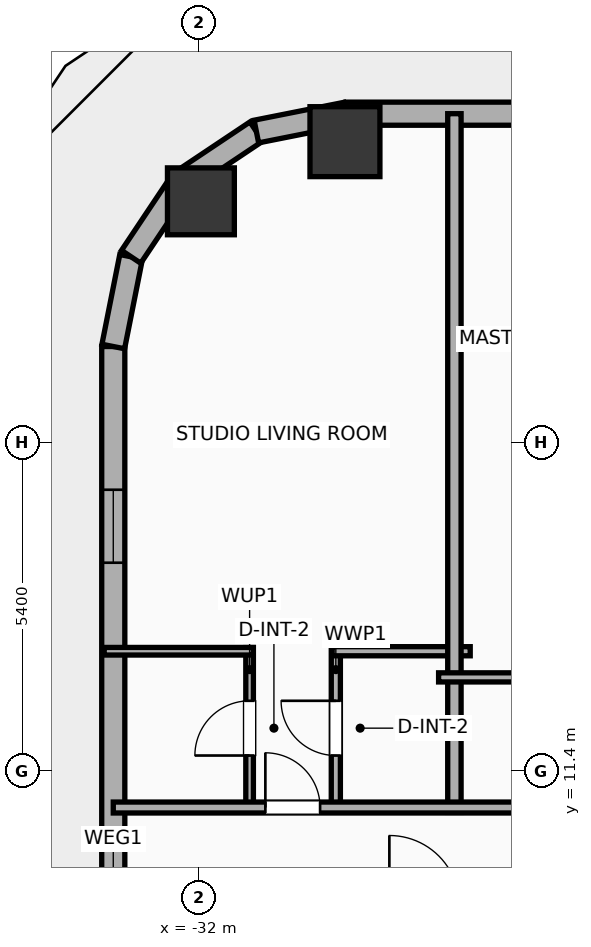
"""IFC4 building model, lengths in metres.
Left out: names, types, materials, properties, quantities, classifications, styles, units other than length and angle.
Written with IfcOpenShell. Run it as: python <this file> out.ifc"""

import sys

from ifc_helpers import new_model, si_unit, direction, frame, frame_2d, origin, origin_2d, place, context, subcontext, project, spatial, rectangle, hollow_rectangle, hollow_circle, extrude, element, fill, save


model = new_model("IFC4")
c1 = context("Model", 3, precision=1e-05, world=origin(), true_north=direction((0.0, 1.0)))
c2 = subcontext(c1, "Body", "Model", "MODEL_VIEW")
j1 = project(units=[si_unit("LENGTHUNIT", "METRE"), si_unit("PLANEANGLEUNIT", "RADIAN")], contexts=[c1])
p1 = place(None, origin())
s1 = spatial("IfcSite", under=j1, at=p1, CompositionType="ELEMENT")
p2 = place(p1, origin())
s2 = spatial("IfcBuilding", under=s1, at=p2, CompositionType="ELEMENT")
p3 = place(p2, frame((0.0, 0.0, 53.3)))
s3 = spatial("IfcBuildingStorey", under=s2, at=p3, CompositionType="ELEMENT", Elevation=53.3)
p4 = place(p3, frame((-29.6, 21.75, 0.0), z_axis=(0.0, 0.0, 1.0), x_axis=(1.0, 0.0, 0.0)))
e1 = element("IfcColumn", 1, at=p4, inside=s3, PredefinedType="COLUMN", context=c2, shape_type="SweptSolid", body=[
    extrude(hollow_rectangle(XDim=1.15, YDim=1.15, WallThickness=0.04, at=origin_2d()), origin(), (0.0, 0.0, 1.0), 3.9),
])
p5 = place(p3, frame((-31.969, 20.769, 0.0), z_axis=(0.0, 0.0, 1.0), x_axis=(1.0, 0.0, 0.0)))
e2 = element("IfcColumn", 2, at=p5, inside=s3, PredefinedType="COLUMN", context=c2, shape_type="SweptSolid", body=[
    extrude(hollow_circle(Radius=0.55, WallThickness=0.036, at=origin_2d()), origin(), (0.0, 0.0, 1.0), 3.9),
])
p6 = place(p3, frame((-33.41, -18.381, 0.0), z_axis=(0.0, 0.0, 1.0), x_axis=(0.0, 1.0, 0.0)))
e3 = element("IfcWall", 3, at=p6, inside=s3, PredefinedType="ELEMENTEDWALL", context=c2, shape_type="SweptSolid", body=[
    extrude(rectangle(XDim=36.763, YDim=0.38, at=frame_2d((18.381, 0.0))), origin(), (0.0, 0.0, 1.0), 3.65),
])
p7 = place(p6, frame((17.631, 0.0, 0.0)))
e4 = element("IfcOpeningElement", 4, at=p7, cuts=e3, PredefinedType="OPENING", context=c2, shape_type="SweptSolid", body=[
    extrude(rectangle(XDim=1.5, YDim=2.05, at=frame_2d((0.75, 1.025))), frame((0.0, 0.2, 0.0), z_axis=(0.0, -1.0, 0.0), x_axis=(1.0, 0.0, 0.0)), (0.0, 0.0, 1.0), 0.4),
])
p8 = place(p6, frame((33.207, 0.0, 0.75)))
e5 = element("IfcOpeningElement", 5, at=p8, cuts=e3, PredefinedType="OPENING", context=c2, shape_type="SweptSolid", body=[
    extrude(rectangle(XDim=1.2, YDim=2.05, at=frame_2d((0.6, 1.025))), frame((0.0, 0.2, 0.0), z_axis=(0.0, -1.0, 0.0), x_axis=(1.0, 0.0, 0.0)), (0.0, 0.0, 1.0), 0.4),
])
p9 = place(p3, frame((-33.41, 18.381, 0.0), z_axis=(0.0, 0.0, 1.0), x_axis=(0.195086038585, 0.980786132421, 0.0)))
e6 = element("IfcWall", 6, at=p9, inside=s3, PredefinedType="ELEMENTEDWALL", context=c2, shape_type="SweptSolid", body=[
    extrude(rectangle(XDim=1.504, YDim=0.38, at=frame_2d((0.752, 0.0))), origin(), (0.0, 0.0, 1.0), 3.65),
])
p10 = place(p3, frame((-33.116, 19.857, 0.0), z_axis=(0.0, 0.0, 1.0), x_axis=(0.555572577804, 0.831468045563, 0.0)))
e7 = element("IfcWall", 7, at=p10, inside=s3, PredefinedType="ELEMENTEDWALL", context=c2, shape_type="SweptSolid", body=[
    extrude(rectangle(XDim=1.485, YDim=0.38, at=frame_2d((0.742, 0.0))), origin(), (0.0, 0.0, 1.0), 3.65),
])
p11 = place(p3, frame((-32.292, 21.091, 0.0), z_axis=(0.0, 0.0, 1.0), x_axis=(0.831442848281, 0.555610286119, 0.0)))
e8 = element("IfcWall", 8, at=p11, inside=s3, PredefinedType="ELEMENTEDWALL", context=c2, shape_type="SweptSolid", body=[
    extrude(rectangle(XDim=1.485, YDim=0.38, at=frame_2d((0.743, 0.0))), origin(), (0.0, 0.0, 1.0), 3.65),
])
p12 = place(p3, frame((-31.057, 21.917, 0.0), z_axis=(0.0, 0.0, 1.0), x_axis=(0.980786132421, 0.195086038585, 0.0)))
e9 = element("IfcWall", 9, at=p12, inside=s3, PredefinedType="ELEMENTEDWALL", context=c2, shape_type="SweptSolid", body=[
    extrude(rectangle(XDim=1.504, YDim=0.38, at=frame_2d((0.752, 0.0))), origin(), (0.0, 0.0, 1.0), 3.65),
])
p13 = place(p3, frame((-29.581, 22.21, 0.0), z_axis=(0.0, 0.0, 1.0), x_axis=(1.0, 0.0, 0.0)))
e10 = element("IfcWall", 10, at=p13, inside=s3, PredefinedType="ELEMENTEDWALL", context=c2, shape_type="SweptSolid", body=[
    extrude(rectangle(XDim=51.963, YDim=0.38, at=frame_2d((25.981, 0.0))), origin(), (0.0, 0.0, 1.0), 3.65),
])
p14 = place(p13, frame((6.61, 0.0, 0.75)))
e11 = element("IfcOpeningElement", 11, at=p14, cuts=e10, PredefinedType="OPENING", context=c2, shape_type="SweptSolid", body=[
    extrude(rectangle(XDim=2.4, YDim=2.1, at=frame_2d((1.2, 1.05))), frame((0.0, 0.2, 0.0), z_axis=(0.0, -1.0, 0.0), x_axis=(1.0, 0.0, 0.0)), (0.0, 0.0, 1.0), 0.4),
])
p15 = place(p13, frame((26.431, 0.0, 0.75)))
e12 = element("IfcOpeningElement", 12, at=p15, cuts=e10, PredefinedType="OPENING", context=c2, shape_type="SweptSolid", body=[
    extrude(rectangle(XDim=2.4, YDim=2.1, at=frame_2d((1.2, 1.05))), frame((0.0, 0.2, 0.0), z_axis=(0.0, -1.0, 0.0), x_axis=(1.0, 0.0, 0.0)), (0.0, 0.0, 1.0), 0.4),
])
p16 = place(p13, frame((43.752, 0.0, 0.75)))
e13 = element("IfcOpeningElement", 13, at=p16, cuts=e10, PredefinedType="OPENING", context=c2, shape_type="SweptSolid", body=[
    extrude(rectangle(XDim=2.4, YDim=2.1, at=frame_2d((1.2, 1.05))), frame((0.0, 0.2, 0.0), z_axis=(0.0, -1.0, 0.0), x_axis=(1.0, 0.0, 0.0)), (0.0, 0.0, 1.0), 0.4),
])
p17 = place(p13, frame((2.789, 0.0, 0.75)))
e14 = element("IfcOpeningElement", 14, at=p17, cuts=e10, PredefinedType="OPENING", context=c2, shape_type="SweptSolid", body=[
    extrude(rectangle(XDim=1.2, YDim=2.05, at=frame_2d((0.6, 1.025))), frame((0.0, 0.2, 0.0), z_axis=(0.0, -1.0, 0.0), x_axis=(1.0, 0.0, 0.0)), (0.0, 0.0, 1.0), 0.4),
])
p18 = place(p13, frame((16.831, 0.0, 0.75)))
e15 = element("IfcOpeningElement", 15, at=p18, cuts=e10, PredefinedType="OPENING", context=c2, shape_type="SweptSolid", body=[
    extrude(rectangle(XDim=1.2, YDim=2.05, at=frame_2d((0.6, 1.025))), frame((0.0, 0.2, 0.0), z_axis=(0.0, -1.0, 0.0), x_axis=(1.0, 0.0, 0.0)), (0.0, 0.0, 1.0), 0.4),
])
p19 = place(p13, frame((13.136, 0.0, 0.75)))
e16 = element("IfcOpeningElement", 16, at=p19, cuts=e10, PredefinedType="OPENING", context=c2, shape_type="SweptSolid", body=[
    extrude(rectangle(XDim=1.2, YDim=2.05, at=frame_2d((0.6, 1.025))), frame((0.0, 0.2, 0.0), z_axis=(0.0, -1.0, 0.0), x_axis=(1.0, 0.0, 0.0)), (0.0, 0.0, 1.0), 0.4),
])
p20 = place(p13, frame((21.456, 0.0, 0.75)))
e17 = element("IfcOpeningElement", 17, at=p20, cuts=e10, PredefinedType="OPENING", context=c2, shape_type="SweptSolid", body=[
    extrude(rectangle(XDim=0.52, YDim=2.05, at=frame_2d((0.26, 1.025))), frame((0.0, 0.2, 0.0), z_axis=(0.0, -1.0, 0.0), x_axis=(1.0, 0.0, 0.0)), (0.0, 0.0, 1.0), 0.4),
])
p21 = place(p13, frame((23.507, 0.0, 0.75)))
e18 = element("IfcOpeningElement", 18, at=p21, cuts=e10, PredefinedType="OPENING", context=c2, shape_type="SweptSolid", body=[
    extrude(rectangle(XDim=1.2, YDim=2.05, at=frame_2d((0.6, 1.025))), frame((0.0, 0.2, 0.0), z_axis=(0.0, -1.0, 0.0), x_axis=(1.0, 0.0, 0.0)), (0.0, 0.0, 1.0), 0.4),
])
p22 = place(p13, frame((37.494, 0.0, 0.75)))
e19 = element("IfcOpeningElement", 19, at=p22, cuts=e10, PredefinedType="OPENING", context=c2, shape_type="SweptSolid", body=[
    extrude(rectangle(XDim=1.2, YDim=2.05, at=frame_2d((0.6, 1.025))), frame((0.0, 0.2, 0.0), z_axis=(0.0, -1.0, 0.0), x_axis=(1.0, 0.0, 0.0)), (0.0, 0.0, 1.0), 0.4),
])
p23 = place(p13, frame((33.733, 0.0, 0.75)))
e20 = element("IfcOpeningElement", 20, at=p23, cuts=e10, PredefinedType="OPENING", context=c2, shape_type="SweptSolid", body=[
    extrude(rectangle(XDim=1.2, YDim=2.05, at=frame_2d((0.6, 1.025))), frame((0.0, 0.2, 0.0), z_axis=(0.0, -1.0, 0.0), x_axis=(1.0, 0.0, 0.0)), (0.0, 0.0, 1.0), 0.4),
])
p24 = place(p13, frame((42.323, 0.0, 0.75)))
e21 = element("IfcOpeningElement", 21, at=p24, cuts=e10, PredefinedType="OPENING", context=c2, shape_type="SweptSolid", body=[
    extrude(rectangle(XDim=0.52, YDim=2.05, at=frame_2d((0.26, 1.025))), frame((0.0, 0.2, 0.0), z_axis=(0.0, -1.0, 0.0), x_axis=(1.0, 0.0, 0.0)), (0.0, 0.0, 1.0), 0.4),
])
p25 = place(p13, frame((47.601, 0.0, 0.75)))
e22 = element("IfcOpeningElement", 22, at=p25, cuts=e10, PredefinedType="OPENING", context=c2, shape_type="SweptSolid", body=[
    extrude(rectangle(XDim=1.2, YDim=2.05, at=frame_2d((0.6, 1.025))), frame((0.0, 0.2, 0.0), z_axis=(0.0, -1.0, 0.0), x_axis=(1.0, 0.0, 0.0)), (0.0, 0.0, 1.0), 0.4),
])
p26 = place(p13, frame((49.681, 0.0, 0.75)))
e23 = element("IfcOpeningElement", 23, at=p26, cuts=e10, PredefinedType="OPENING", context=c2, shape_type="SweptSolid", body=[
    extrude(rectangle(XDim=1.2, YDim=2.05, at=frame_2d((0.6, 1.025))), frame((0.0, 0.2, 0.0), z_axis=(0.0, -1.0, 0.0), x_axis=(1.0, 0.0, 0.0)), (0.0, 0.0, 1.0), 0.4),
])
p27 = place(p3, frame((-31.168, 10.78, 0.0), z_axis=(0.0, 0.0, 1.0), x_axis=(0.0, 1.0, 0.0)))
e24 = element("IfcWall", 24, at=p27, inside=s3, PredefinedType="PARTITIONING", context=c2, shape_type="SweptSolid", body=[
    extrude(rectangle(XDim=2.65, YDim=0.125, at=frame_2d((1.325, 0.0))), origin(), (0.0, 0.0, 1.0), 3.65),
])
p28 = place(p27, frame((0.875, 0.0, 0.0)))
e25 = element("IfcOpeningElement", 25, at=p28, cuts=e24, PredefinedType="OPENING", context=c2, shape_type="SweptSolid", body=[
    extrude(rectangle(XDim=0.9, YDim=2.05, at=frame_2d((0.45, 1.025))), frame((0.0, 0.073, 0.0), z_axis=(0.0, -1.0, 0.0), x_axis=(1.0, 0.0, 0.0)), (0.0, 0.0, 1.0), 0.145),
])
p29 = place(p3, frame((-29.75, 10.78, 0.0), z_axis=(0.0, 0.0, 1.0), x_axis=(0.0, 1.0, 0.0)))
e26 = element("IfcWall", 26, at=p29, inside=s3, PredefinedType="PLUMBINGWALL", context=c2, shape_type="SweptSolid", body=[
    extrude(rectangle(XDim=2.65, YDim=0.15, at=frame_2d((1.325, 0.0))), origin(), (0.0, 0.0, 1.0), 3.65),
])
p30 = place(p29, frame((0.875, 0.0, 0.0)))
e27 = element("IfcOpeningElement", 27, at=p30, cuts=e26, PredefinedType="OPENING", context=c2, shape_type="SweptSolid", body=[
    extrude(rectangle(XDim=0.9, YDim=2.05, at=frame_2d((0.45, 1.025))), frame((0.0, 0.085, 0.0), z_axis=(0.0, -1.0, 0.0), x_axis=(1.0, 0.0, 0.0)), (0.0, 0.0, 1.0), 0.17),
])
p31 = place(p3, frame((-33.56, 13.37, 0.0), z_axis=(0.0, 0.0, 1.0), x_axis=(1.0, 0.0, 0.0)))
e28 = element("IfcWall", 28, at=p31, inside=s3, PredefinedType="PARTITIONING", context=c2, shape_type="SweptSolid", body=[
    extrude(rectangle(XDim=2.452, YDim=0.125, at=frame_2d((1.226, 0.0))), origin(), (0.0, 0.0, 1.0), 3.65),
])
p32 = place(p3, frame((-29.81, 13.37, 0.0), z_axis=(0.0, 0.0, 1.0), x_axis=(1.0, 0.0, 0.0)))
e29 = element("IfcWall", 29, at=p32, inside=s3, PredefinedType="PLUMBINGWALL", context=c2, shape_type="SweptSolid", body=[
    extrude(rectangle(XDim=2.27, YDim=0.15, at=frame_2d((1.135, 0.0))), origin(), (0.0, 0.0, 1.0), 3.65),
])
p33 = place(p3, frame((-27.8, 10.72, 0.0), z_axis=(0.0, 0.0, 1.0), x_axis=(0.0, 1.0, 0.0)))
e30 = element("IfcWall", 30, at=p33, inside=s3, PredefinedType="PARTITIONING", context=c2, shape_type="SweptSolid", body=[
    extrude(rectangle(XDim=11.49, YDim=0.22, at=frame_2d((5.745, 0.0))), origin(), (0.0, 0.0, 1.0), 3.65),
])
p34 = place(p3, frame((-28.06, 12.94, 0.0), z_axis=(0.0, 0.0, 1.0), x_axis=(1.0, 0.0, 0.0)))
e31 = element("IfcWall", 31, at=p34, inside=s3, PredefinedType="PLUMBINGWALL", context=c2, shape_type="SweptSolid", body=[
    extrude(rectangle(XDim=3.555, YDim=0.15, at=frame_2d((1.778, 0.0))), origin(), (0.0, 0.0, 1.0), 3.65),
])
p35 = place(p3, frame((-33.41, 10.8, 0.0), z_axis=(0.0, 0.0, 1.0), x_axis=(1.0, 0.0, 0.0)))
e32 = element("IfcWall", 32, at=p35, inside=s3, PredefinedType="PARTITIONING", context=c2, shape_type="SweptSolid", body=[
    extrude(rectangle(XDim=59.62, YDim=0.18, at=frame_2d((29.81, 0.0))), origin(), (0.0, 0.0, 1.0), 3.65),
])
p36 = place(p35, frame((2.501, 0.0, 0.0)))
e33 = element("IfcOpeningElement", 33, at=p36, cuts=e32, PredefinedType="OPENING", context=c2, shape_type="SweptSolid", body=[
    extrude(rectangle(XDim=0.9, YDim=2.05, at=frame_2d((0.45, 1.025))), frame((0.0, 0.1, 0.0), z_axis=(0.0, -1.0, 0.0), x_axis=(1.0, 0.0, 0.0)), (0.0, 0.0, 1.0), 0.2),
])
p37 = place(p35, frame((10.156, 0.0, 0.0)))
e34 = element("IfcOpeningElement", 34, at=p37, cuts=e32, PredefinedType="OPENING", context=c2, shape_type="SweptSolid", body=[
    extrude(rectangle(XDim=1.15, YDim=2.05, at=frame_2d((0.575, 1.025))), frame((0.0, 0.1, 0.0), z_axis=(0.0, -1.0, 0.0), x_axis=(1.0, 0.0, 0.0)), (0.0, 0.0, 1.0), 0.2),
])
p38 = place(p35, frame((20.686, 0.0, 0.0)))
e35 = element("IfcOpeningElement", 35, at=p38, cuts=e32, PredefinedType="OPENING", context=c2, shape_type="SweptSolid", body=[
    extrude(rectangle(XDim=1.15, YDim=2.05, at=frame_2d((0.575, 1.025))), frame((0.0, 0.1, 0.0), z_axis=(0.0, -1.0, 0.0), x_axis=(1.0, 0.0, 0.0)), (0.0, 0.0, 1.0), 0.2),
])
p39 = place(p35, frame((30.982, 0.0, 0.0)))
e36 = element("IfcOpeningElement", 36, at=p39, cuts=e32, PredefinedType="OPENING", context=c2, shape_type="SweptSolid", body=[
    extrude(rectangle(XDim=1.15, YDim=2.05, at=frame_2d((0.575, 1.025))), frame((0.0, 0.1, 0.0), z_axis=(0.0, -1.0, 0.0), x_axis=(1.0, 0.0, 0.0)), (0.0, 0.0, 1.0), 0.2),
])
p40 = place(p35, frame((41.35, 0.0, 0.0)))
e37 = element("IfcOpeningElement", 37, at=p40, cuts=e32, PredefinedType="OPENING", context=c2, shape_type="SweptSolid", body=[
    extrude(rectangle(XDim=1.15, YDim=2.05, at=frame_2d((0.575, 1.025))), frame((0.0, 0.1, 0.0), z_axis=(0.0, -1.0, 0.0), x_axis=(1.0, 0.0, 0.0)), (0.0, 0.0, 1.0), 0.2),
])
p41 = place(p35, frame((48.331, 0.0, 0.0)))
e38 = element("IfcOpeningElement", 38, at=p41, cuts=e32, PredefinedType="OPENING", context=c2, shape_type="SweptSolid", body=[
    extrude(rectangle(XDim=1.15, YDim=2.05, at=frame_2d((0.575, 1.025))), frame((0.0, 0.1, 0.0), z_axis=(0.0, -1.0, 0.0), x_axis=(1.0, 0.0, 0.0)), (0.0, 0.0, 1.0), 0.2),
])
p42 = place(p35, frame((56.177, 0.0, 0.0)))
e39 = element("IfcOpeningElement", 39, at=p42, cuts=e32, PredefinedType="OPENING", context=c2, shape_type="SweptSolid", body=[
    extrude(rectangle(XDim=0.9, YDim=2.05, at=frame_2d((0.45, 1.025))), frame((0.0, 0.1, 0.0), z_axis=(0.0, -1.0, 0.0), x_axis=(1.0, 0.0, 0.0)), (0.0, 0.0, 1.0), 0.2),
])
p43 = place(p8, origin())
e40 = element("IfcWindow", 40, at=p43, inside=s3, PartitioningType="SINGLE_PANEL", PredefinedType="WINDOW", context=c2, shape_type="SweptSolid", body=[
    extrude(rectangle(XDim=1.2, YDim=2.05, at=frame_2d((0.6, 1.025))), frame((0.0, 0.03, 0.0), z_axis=(0.0, -1.0, 0.0), x_axis=(1.0, 0.0, 0.0)), (0.0, 0.0, 1.0), 0.06),
])
fill(e5, e40)
p44 = place(p28, origin())
e41 = element("IfcDoor", 41, at=p44, inside=s3, OperationType="SINGLE_SWING_LEFT", PredefinedType="DOOR", context=c2, shape_type="SweptSolid", body=[
    extrude(rectangle(XDim=0.9, YDim=2.05, at=frame_2d((0.45, 1.025))), frame((0.0, 0.025, 0.0), z_axis=(0.0, -1.0, 0.0), x_axis=(1.0, 0.0, 0.0)), (0.0, 0.0, 1.0), 0.05),
])
fill(e25, e41)
p45 = place(p30, origin())
e42 = element("IfcDoor", 42, at=p45, inside=s3, OperationType="SINGLE_SWING_RIGHT", PredefinedType="DOOR", context=c2, shape_type="SweptSolid", body=[
    extrude(rectangle(XDim=0.9, YDim=2.05, at=frame_2d((0.45, 1.025))), frame((0.0, 0.025, 0.0), z_axis=(0.0, -1.0, 0.0), x_axis=(1.0, 0.0, 0.0)), (0.0, 0.0, 1.0), 0.05),
])
fill(e27, e42)
p46 = place(p36, origin())
e43 = element("IfcDoor", 43, at=p46, inside=s3, OperationType="SINGLE_SWING_LEFT", PredefinedType="DOOR", context=c2, shape_type="SweptSolid", body=[
    extrude(rectangle(XDim=0.9, YDim=2.05, at=frame_2d((0.45, 1.025))), frame((0.0, 0.025, 0.0), z_axis=(0.0, -1.0, 0.0), x_axis=(1.0, 0.0, 0.0)), (0.0, 0.0, 1.0), 0.05),
])
fill(e33, e43)
save(model, sys.argv[1])
